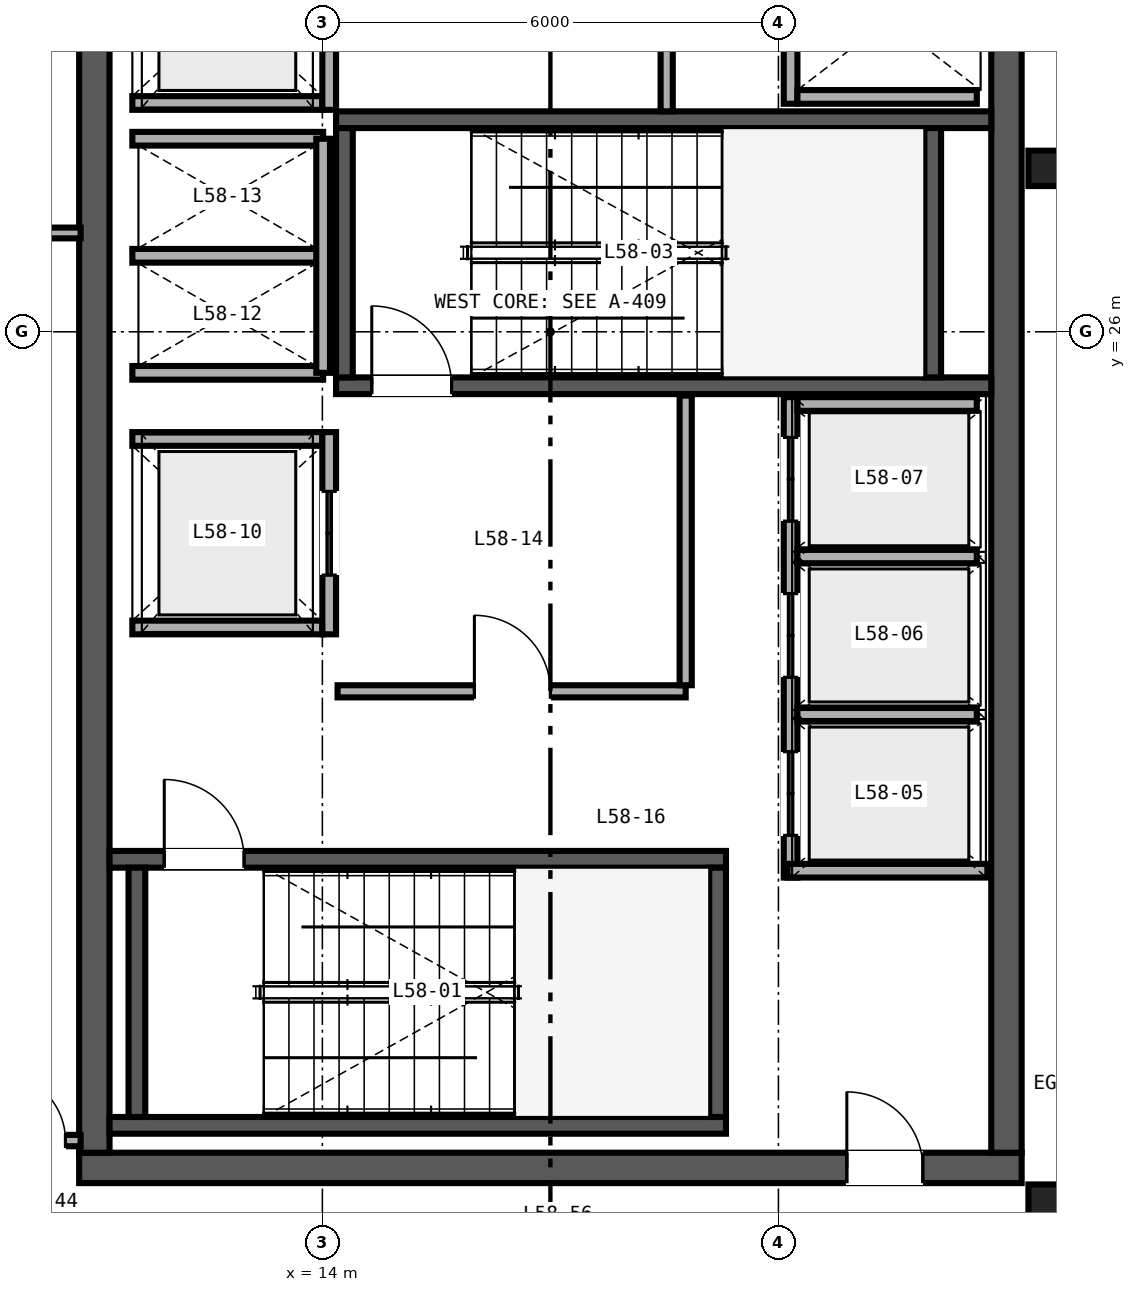
"""IFC4 building model, lengths in metres.
Left out: names, types, materials, properties, quantities, classifications, styles, units other than length and angle.
Written with IfcOpenShell. Run it as: python <this file> out.ifc"""

import sys

from ifc_helpers import new_model, si_unit, direction, frame, frame_2d, origin, origin_2d, place, context, subcontext, project, spatial, rectangle, i_section, extrude, source, transform, mapped, element, fill, save


model = new_model("IFC4")
c1 = context("Model", 3, precision=1e-05, world=origin(), true_north=direction((0.0, 1.0)))
c2 = subcontext(c1, "Body", "Model", "MODEL_VIEW")
j1 = project(units=[si_unit("LENGTHUNIT", "METRE"), si_unit("PLANEANGLEUNIT", "RADIAN")], contexts=[c1])
p1 = place(None, origin())
s1 = spatial("IfcSite", under=j1, at=p1, CompositionType="ELEMENT")
p2 = place(p1, origin())
s2 = spatial("IfcBuilding", under=s1, at=p2, CompositionType="ELEMENT")
p3 = place(p2, frame((0.0, 0.0, 232.8)))
s3 = spatial("IfcBuildingStorey", under=s2, at=p3, CompositionType="ELEMENT", Elevation=232.8)
p4 = place(p3, frame((10.8, 15.0, 0.0), z_axis=(0.0, 0.0, 1.0), x_axis=(1.0, 0.0, 0.0)))
e1 = element("IfcWall", 1, at=p4, inside=s3, PredefinedType="SHEAR", context=c2, shape_type="SweptSolid", body=[
    extrude(rectangle(XDim=12.4, YDim=0.4, at=frame_2d((6.2, 0.0))), origin(), (0.0, 0.0, 1.0), 3.38),
])
p5 = place(p4, frame((10.1, 0.0, 0.0)))
e2 = element("IfcOpeningElement", 2, at=p5, cuts=e1, PredefinedType="OPENING", context=c2, shape_type="SweptSolid", body=[
    extrude(rectangle(XDim=1.0, YDim=2.15, at=frame_2d((0.5, 1.075))), frame((0.0, 0.21, 0.0), z_axis=(0.0, -1.0, 0.0), x_axis=(1.0, 0.0, 0.0)), (0.0, 0.0, 1.0), 0.42),
])
for number, where, z_axis, x_axis in (
    (3, (11.0, 15.2, 0.0), (0.0, 0.0, 1.0), (0.0, 1.0, 0.0)),
    (4, (23.0, 15.2, 0.0), (0.0, 0.0, 1.0), (0.0, 1.0, 0.0)),
):
    element("IfcWall", number, at=place(p3, frame(where, z_axis=z_axis, x_axis=x_axis)), inside=s3, PredefinedType="SHEAR", context=c2, shape_type="SweptSolid", body=[
        extrude(rectangle(XDim=21.6, YDim=0.4, at=frame_2d((10.8, 0.0))), origin(), (0.0, 0.0, 1.0), 3.38),
    ])
p6 = place(p3, frame((11.2, 15.56, 0.0), z_axis=(0.0, 0.0, 1.0), x_axis=(1.0, 0.0, 0.0)))
e5 = element("IfcWall", 5, at=p6, inside=s3, PredefinedType="SHEAR", context=c2, shape_type="SweptSolid", body=[
    extrude(rectangle(XDim=8.11, YDim=0.22, at=frame_2d((4.055, 0.0))), origin(), (0.0, 0.0, 1.0), 3.4),
])
p7 = place(p3, frame((11.2, 19.06, 0.0), z_axis=(0.0, 0.0, 1.0), x_axis=(1.0, 0.0, 0.0)))
e6 = element("IfcWall", 6, at=p7, inside=s3, PredefinedType="SHEAR", context=c2, shape_type="SweptSolid", body=[
    extrude(rectangle(XDim=8.11, YDim=0.22, at=frame_2d((4.055, 0.0))), origin(), (0.0, 0.0, 1.0), 3.4),
])
p8 = place(p7, frame((0.72, 0.0, 0.0)))
e7 = element("IfcOpeningElement", 7, at=p8, cuts=e6, PredefinedType="OPENING", context=c2, shape_type="SweptSolid", body=[
    extrude(rectangle(XDim=1.05, YDim=2.15, at=frame_2d((0.525, 1.075))), frame((0.0, 0.12, 0.0), z_axis=(0.0, -1.0, 0.0), x_axis=(1.0, 0.0, 0.0)), (0.0, 0.0, 1.0), 0.24),
])
for number, where, z_axis, x_axis in (
    (8, (11.56, 15.67, 0.0), (0.0, 0.0, 1.0), (0.0, 1.0, 0.0)),
    (9, (19.2, 15.67, 0.0), (0.0, 0.0, 1.0), (0.0, 1.0, 0.0)),
):
    element("IfcWall", number, at=place(p3, frame(where, z_axis=z_axis, x_axis=x_axis)), inside=s3, PredefinedType="SHEAR", context=c2, shape_type="SweptSolid", body=[
        extrude(rectangle(XDim=3.28, YDim=0.22, at=frame_2d((1.64, 0.0))), origin(), (0.0, 0.0, 1.0), 3.4),
    ])
p9 = place(p3, frame((14.18, 25.29, 0.0), z_axis=(0.0, 0.0, 1.0), x_axis=(1.0, 0.0, 0.0)))
e10 = element("IfcWall", 10, at=p9, inside=s3, PredefinedType="SHEAR", context=c2, shape_type="SweptSolid", body=[
    extrude(rectangle(XDim=8.62, YDim=0.22, at=frame_2d((4.31, 0.0))), origin(), (0.0, 0.0, 1.0), 3.4),
])
p10 = place(p9, frame((0.47, 0.0, 0.0)))
e11 = element("IfcOpeningElement", 11, at=p10, cuts=e10, PredefinedType="OPENING", context=c2, shape_type="SweptSolid", body=[
    extrude(rectangle(XDim=1.05, YDim=2.15, at=frame_2d((0.525, 1.075))), frame((0.0, 0.12, 0.0), z_axis=(0.0, -1.0, 0.0), x_axis=(1.0, 0.0, 0.0)), (0.0, 0.0, 1.0), 0.24),
])
p11 = place(p3, frame((14.18, 28.79, 0.0), z_axis=(0.0, 0.0, 1.0), x_axis=(1.0, 0.0, 0.0)))
e12 = element("IfcWall", 12, at=p11, inside=s3, PredefinedType="SHEAR", context=c2, shape_type="SweptSolid", body=[
    extrude(rectangle(XDim=8.62, YDim=0.22, at=frame_2d((4.31, 0.0))), origin(), (0.0, 0.0, 1.0), 3.4),
])
for number, where, z_axis, x_axis in (
    (13, (14.29, 25.4, 0.0), (0.0, 0.0, 1.0), (0.0, 1.0, 0.0)),
    (14, (22.03, 25.4, 0.0), (0.0, 0.0, 1.0), (0.0, 1.0, 0.0)),
):
    element("IfcWall", number, at=place(p3, frame(where, z_axis=z_axis, x_axis=x_axis)), inside=s3, PredefinedType="SHEAR", context=c2, shape_type="SweptSolid", body=[
        extrude(rectangle(XDim=3.28, YDim=0.22, at=frame_2d((1.64, 0.0))), origin(), (0.0, 0.0, 1.0), 3.4),
    ])
m1 = source(origin(), c2, "Body", "SweptSolid", [
    extrude(i_section(OverallWidth=0.422, OverallDepth=0.465, WebThickness=0.045, FlangeThickness=0.073, FilletRadius=0.025, at=origin_2d()), origin(), (0.0, 0.0, 1.0), 3.38),
])
for number, where, z_axis, x_axis in (
    (15, (23.5, 14.55, 0.0), (0.0, 0.0, 1.0), (1.0, 0.0, 0.0)),
    (16, (23.5, 28.15, 0.0), (0.0, 0.0, 1.0), (1.0, 0.0, 0.0)),
):
    element("IfcColumn", number, at=place(p3, frame(where, z_axis=z_axis, x_axis=x_axis)), inside=s3, PredefinedType="COLUMN", context=c2, shape_type="MappedRepresentation", body=[
        mapped(m1, transform((0.0, 0.0, 0.0), scale=1.0)),
    ])
p12 = place(p3, frame((20.16, 18.82, 0.0), z_axis=(0.0, 0.0, 1.0), x_axis=(0.0, 1.0, 0.0)))
e17 = element("IfcWall", 17, at=p12, inside=s3, PredefinedType="SOLIDWALL", context=c2, shape_type="SweptSolid", body=[
    extrude(rectangle(XDim=6.32, YDim=0.18, at=frame_2d((3.16, 0.0))), origin(), (0.0, 0.0, 1.0), 2.48),
])
p13 = place(p12, frame((0.555, 0.0, 0.0)))
e18 = element("IfcOpeningElement", 18, at=p13, cuts=e17, PredefinedType="OPENING", context=c2, shape_type="SweptSolid", body=[
    extrude(rectangle(XDim=1.1, YDim=2.2, at=frame_2d((0.55, 1.1))), frame((0.0, 0.1, 0.0), z_axis=(0.0, -1.0, 0.0), x_axis=(1.0, 0.0, 0.0)), (0.0, 0.0, 1.0), 0.2),
])
p14 = place(p12, frame((2.635, 0.0, 0.0)))
e19 = element("IfcOpeningElement", 19, at=p14, cuts=e17, PredefinedType="OPENING", context=c2, shape_type="SweptSolid", body=[
    extrude(rectangle(XDim=1.1, YDim=2.2, at=frame_2d((0.55, 1.1))), frame((0.0, 0.1, 0.0), z_axis=(0.0, -1.0, 0.0), x_axis=(1.0, 0.0, 0.0)), (0.0, 0.0, 1.0), 0.2),
])
p15 = place(p12, frame((4.69, 0.0, 0.0)))
e20 = element("IfcOpeningElement", 20, at=p15, cuts=e17, PredefinedType="OPENING", context=c2, shape_type="SweptSolid", body=[
    extrude(rectangle(XDim=1.1, YDim=2.2, at=frame_2d((0.55, 1.1))), frame((0.0, 0.1, 0.0), z_axis=(0.0, -1.0, 0.0), x_axis=(1.0, 0.0, 0.0)), (0.0, 0.0, 1.0), 0.2),
])
p16 = place(p3, frame((20.12, 18.91, 0.0), z_axis=(0.0, 0.0, 1.0), x_axis=(1.0, 0.0, 0.0)))
e21 = element("IfcWall", 21, at=p16, inside=s3, PredefinedType="SOLIDWALL", context=c2, shape_type="SweptSolid", body=[
    extrude(rectangle(XDim=2.63, YDim=0.18, at=frame_2d((1.315, 0.0))), origin(), (0.0, 0.0, 1.0), 3.38),
])
p17 = place(p3, frame((20.25, 25.05, 0.0), z_axis=(0.0, 0.0, 1.0), x_axis=(1.0, 0.0, 0.0)))
e22 = element("IfcWall", 22, at=p17, inside=s3, PredefinedType="SOLIDWALL", context=c2, shape_type="SweptSolid", body=[
    extrude(rectangle(XDim=2.36, YDim=0.18, at=frame_2d((1.18, 0.0))), origin(), (0.0, 0.0, 1.0), 3.38),
])
p18 = place(p3, frame((20.25, 20.965, 0.0), z_axis=(0.0, 0.0, 1.0), x_axis=(1.0, 0.0, 0.0)))
e23 = element("IfcWall", 23, at=p18, inside=s3, PredefinedType="SOLIDWALL", context=c2, shape_type="SweptSolid", body=[
    extrude(rectangle(XDim=2.36, YDim=0.18, at=frame_2d((1.18, 0.0))), origin(), (0.0, 0.0, 1.0), 2.48),
])
p19 = place(p3, frame((20.25, 23.045, 0.0), z_axis=(0.0, 0.0, 1.0), x_axis=(1.0, 0.0, 0.0)))
e24 = element("IfcWall", 24, at=p19, inside=s3, PredefinedType="SOLIDWALL", context=c2, shape_type="SweptSolid", body=[
    extrude(rectangle(XDim=2.36, YDim=0.18, at=frame_2d((1.18, 0.0))), origin(), (0.0, 0.0, 1.0), 3.38),
])
p20 = place(p3, frame((20.16, 29.0, 0.0), z_axis=(0.0, 0.0, 1.0), x_axis=(0.0, 1.0, 0.0)))
e25 = element("IfcWall", 25, at=p20, inside=s3, PredefinedType="SOLIDWALL", context=c2, shape_type="SweptSolid", body=[
    extrude(rectangle(XDim=4.29, YDim=0.18, at=frame_2d((2.145, 0.0))), origin(), (0.0, 0.0, 1.0), 3.38),
])
p21 = place(p3, frame((20.25, 29.09, 0.0), z_axis=(0.0, 0.0, 1.0), x_axis=(1.0, 0.0, 0.0)))
e26 = element("IfcWall", 26, at=p21, inside=s3, PredefinedType="SOLIDWALL", context=c2, shape_type="SweptSolid", body=[
    extrude(rectangle(XDim=2.36, YDim=0.18, at=frame_2d((1.18, 0.0))), origin(), (0.0, 0.0, 1.0), 3.38),
])
for number, where, z_axis, x_axis in (
    (27, (11.5, 22.11, 0.0), (0.0, 0.0, 1.0), (1.0, 0.0, 0.0)),
    (28, (11.5, 24.59, 0.0), (0.0, 0.0, 1.0), (1.0, 0.0, 0.0)),
):
    element("IfcWall", number, at=place(p3, frame(where, z_axis=z_axis, x_axis=x_axis)), inside=s3, PredefinedType="SOLIDWALL", context=c2, shape_type="SweptSolid", body=[
        extrude(rectangle(XDim=2.5, YDim=0.18, at=frame_2d((1.25, 0.0))), origin(), (0.0, 0.0, 1.0), 3.38),
    ])
p22 = place(p3, frame((14.09, 22.02, 0.0), z_axis=(0.0, 0.0, 1.0), x_axis=(0.0, 1.0, 0.0)))
e29 = element("IfcWall", 29, at=p22, inside=s3, PredefinedType="SOLIDWALL", context=c2, shape_type="SweptSolid", body=[
    extrude(rectangle(XDim=2.66, YDim=0.18, at=frame_2d((1.33, 0.0))), origin(), (0.0, 0.0, 1.0), 3.38),
])
p23 = place(p22, frame((0.78, 0.0, 0.0)))
e30 = element("IfcOpeningElement", 30, at=p23, cuts=e29, PredefinedType="OPENING", context=c2, shape_type="SweptSolid", body=[
    extrude(rectangle(XDim=1.1, YDim=2.2, at=frame_2d((0.55, 1.1))), frame((0.0, 0.1, 0.0), z_axis=(0.0, -1.0, 0.0), x_axis=(1.0, 0.0, 0.0)), (0.0, 0.0, 1.0), 0.2),
])
p24 = place(p3, frame((11.5, 29.01, 0.0), z_axis=(0.0, 0.0, 1.0), x_axis=(1.0, 0.0, 0.0)))
e31 = element("IfcWall", 31, at=p24, inside=s3, PredefinedType="SOLIDWALL", context=c2, shape_type="SweptSolid", body=[
    extrude(rectangle(XDim=2.5, YDim=0.18, at=frame_2d((1.25, 0.0))), origin(), (0.0, 0.0, 1.0), 3.38),
])
p25 = place(p3, frame((14.09, 28.92, 0.0), z_axis=(0.0, 0.0, 1.0), x_axis=(0.0, 1.0, 0.0)))
e32 = element("IfcWall", 32, at=p25, inside=s3, PredefinedType="SOLIDWALL", context=c2, shape_type="SweptSolid", body=[
    extrude(rectangle(XDim=2.66, YDim=0.18, at=frame_2d((1.33, 0.0))), origin(), (0.0, 0.0, 1.0), 3.38),
])
p26 = place(p25, frame((0.78, 0.0, 0.0)))
e33 = element("IfcOpeningElement", 33, at=p26, cuts=e32, PredefinedType="OPENING", context=c2, shape_type="SweptSolid", body=[
    extrude(rectangle(XDim=1.1, YDim=2.2, at=frame_2d((0.55, 1.1))), frame((0.0, 0.1, 0.0), z_axis=(0.0, -1.0, 0.0), x_axis=(1.0, 0.0, 0.0)), (0.0, 0.0, 1.0), 0.2),
])
for number, where, z_axis, x_axis in (
    (34, (11.5, 25.46, 0.0), (0.0, 0.0, 1.0), (1.0, 0.0, 0.0)),
    (35, (11.5, 27.0, 0.0), (0.0, 0.0, 1.0), (1.0, 0.0, 0.0)),
    (36, (11.5, 28.54, 0.0), (0.0, 0.0, 1.0), (1.0, 0.0, 0.0)),
):
    element("IfcWall", number, at=place(p3, frame(where, z_axis=z_axis, x_axis=x_axis)), inside=s3, PredefinedType="SOLIDWALL", context=c2, shape_type="SweptSolid", body=[
        extrude(rectangle(XDim=2.51, YDim=0.18, at=frame_2d((1.255, 0.0))), origin(), (0.0, 0.0, 1.0), 3.38),
    ])
p27 = place(p3, frame((14.01, 25.46, 0.0), z_axis=(0.0, 0.0, 1.0), x_axis=(0.0, 1.0, 0.0)))
e37 = element("IfcWall", 37, at=p27, inside=s3, PredefinedType="SOLIDWALL", context=c2, shape_type="SweptSolid", body=[
    extrude(rectangle(XDim=3.08, YDim=0.18, at=frame_2d((1.54, 0.0))), origin(), (0.0, 0.0, 1.0), 3.38),
])
p28 = place(p3, frame((14.2, 21.27, 0.0), z_axis=(0.0, 0.0, 1.0), x_axis=(1.0, 0.0, 0.0)))
e38 = element("IfcWall", 38, at=p28, inside=s3, PredefinedType="PARTITIONING", context=c2, shape_type="SweptSolid", body=[
    extrude(rectangle(XDim=4.58, YDim=0.16, at=frame_2d((2.29, 0.0))), origin(), (0.0, 0.0, 1.0), 3.38),
])
p29 = place(p28, frame((1.8, 0.0, 0.0)))
e39 = element("IfcOpeningElement", 39, at=p29, cuts=e38, PredefinedType="OPENING", context=c2, shape_type="SweptSolid", body=[
    extrude(rectangle(XDim=1.0, YDim=2.15, at=frame_2d((0.5, 1.075))), frame((0.0, 0.09, 0.0), z_axis=(0.0, -1.0, 0.0), x_axis=(1.0, 0.0, 0.0)), (0.0, 0.0, 1.0), 0.18),
])
p30 = place(p3, frame((18.78, 21.35, 0.0), z_axis=(0.0, 0.0, 1.0), x_axis=(0.0, 1.0, 0.0)))
e40 = element("IfcWall", 40, at=p30, inside=s3, PredefinedType="PARTITIONING", context=c2, shape_type="SweptSolid", body=[
    extrude(rectangle(XDim=3.81, YDim=0.16, at=frame_2d((1.905, 0.0))), origin(), (0.0, 0.0, 1.0), 3.38),
])
p31 = place(p3, frame((18.53, 28.9, 0.0), z_axis=(0.0, 0.0, 1.0), x_axis=(0.0, 1.0, 0.0)))
e41 = element("IfcWall", 41, at=p31, inside=s3, PredefinedType="PARTITIONING", context=c2, shape_type="SweptSolid", body=[
    extrude(rectangle(XDim=3.9, YDim=0.16, at=frame_2d((1.95, 0.0))), origin(), (0.0, 0.0, 1.0), 3.38),
])
p32 = place(p31, frame((1.5, 0.0, 0.0)))
e42 = element("IfcOpeningElement", 42, at=p32, cuts=e41, PredefinedType="OPENING", context=c2, shape_type="SweptSolid", body=[
    extrude(rectangle(XDim=1.0, YDim=2.15, at=frame_2d((0.5, 1.075))), frame((0.0, 0.09, 0.0), z_axis=(0.0, -1.0, 0.0), x_axis=(1.0, 0.0, 0.0)), (0.0, 0.0, 1.0), 0.18),
])
p33 = place(p3, frame((8.16, 15.36, 0.0), z_axis=(0.0, 0.0, 1.0), x_axis=(1.0, 0.0, 0.0)))
e43 = element("IfcWall", 43, at=p33, inside=s3, PredefinedType="PARTITIONING", context=c2, shape_type="SweptSolid", body=[
    extrude(rectangle(XDim=2.66, YDim=0.15, at=frame_2d((1.33, 0.0))), origin(), (0.0, 0.0, 1.0), 2.601),
])
p34 = place(p33, frame((1.58, 0.0, 0.0)))
e44 = element("IfcOpeningElement", 44, at=p34, cuts=e43, PredefinedType="OPENING", context=c2, shape_type="SweptSolid", body=[
    extrude(rectangle(XDim=0.88, YDim=2.15, at=frame_2d((0.44, 1.075))), frame((0.0, 0.085, 0.0), z_axis=(0.0, -1.0, 0.0), x_axis=(1.0, 0.0, 0.0)), (0.0, 0.0, 1.0), 0.17),
])
p35 = place(p3, frame((8.16, 27.3, 0.0), z_axis=(0.0, 0.0, 1.0), x_axis=(1.0, 0.0, 0.0)))
e45 = element("IfcWall", 45, at=p35, inside=s3, PredefinedType="PARTITIONING", context=c2, shape_type="SweptSolid", body=[
    extrude(rectangle(XDim=2.66, YDim=0.142, at=frame_2d((1.33, 0.0))), origin(), (0.0, 0.0, 1.0), 2.601),
])
m2 = source(origin(), c2, "Body", "SweptSolid", [
    extrude(rectangle(XDim=1.05, YDim=2.15, at=frame_2d((0.525, 1.075))), frame((0.0, 0.025, 0.0), z_axis=(0.0, -1.0, 0.0), x_axis=(1.0, 0.0, 0.0)), (0.0, 0.0, 1.0), 0.05),
])
p36 = place(p8, origin())
e46 = element("IfcDoor", 46, at=p36, inside=s3, OperationType="SINGLE_SWING_LEFT", PredefinedType="DOOR", context=c2, shape_type="MappedRepresentation", body=[
    mapped(m2, transform((0.0, 0.0, 0.0), scale=1.0)),
])
fill(e7, e46)
p37 = place(p10, origin())
e47 = element("IfcDoor", 47, at=p37, inside=s3, OperationType="SINGLE_SWING_LEFT", PredefinedType="DOOR", context=c2, shape_type="MappedRepresentation", body=[
    mapped(m2, transform((0.0, 0.0, 0.0), scale=1.0)),
])
fill(e11, e47)
m3 = source(origin(), c2, "Body", "SweptSolid", [
    extrude(rectangle(XDim=1.1, YDim=2.2, at=frame_2d((0.55, 1.1))), frame((0.0, 0.025, 0.0), z_axis=(0.0, -1.0, 0.0), x_axis=(1.0, 0.0, 0.0)), (0.0, 0.0, 1.0), 0.05),
])
p38 = place(p13, origin())
e48 = element("IfcDoor", 48, at=p38, inside=s3, OperationType="DOUBLE_DOOR_SLIDING", PredefinedType="DOOR", context=c2, shape_type="MappedRepresentation", body=[
    mapped(m3, transform((0.0, 0.0, 0.0), scale=1.0)),
])
fill(e18, e48)
p39 = place(p14, origin())
e49 = element("IfcDoor", 49, at=p39, inside=s3, OperationType="DOUBLE_DOOR_SLIDING", PredefinedType="DOOR", context=c2, shape_type="MappedRepresentation", body=[
    mapped(m3, transform((0.0, 0.0, 0.0), scale=1.0)),
])
fill(e19, e49)
p40 = place(p15, origin())
e50 = element("IfcDoor", 50, at=p40, inside=s3, OperationType="DOUBLE_DOOR_SLIDING", PredefinedType="DOOR", context=c2, shape_type="MappedRepresentation", body=[
    mapped(m3, transform((0.0, 0.0, 0.0), scale=1.0)),
])
fill(e20, e50)
p41 = place(p23, origin())
e51 = element("IfcDoor", 51, at=p41, inside=s3, OperationType="DOUBLE_DOOR_SLIDING", PredefinedType="DOOR", context=c2, shape_type="MappedRepresentation", body=[
    mapped(m3, transform((0.0, 0.0, 0.0), scale=1.0)),
])
fill(e30, e51)
m4 = source(origin(), c2, "Body", "SweptSolid", [
    extrude(rectangle(XDim=1.0, YDim=2.15, at=frame_2d((0.5, 1.075))), frame((0.0, 0.025, 0.0), z_axis=(0.0, -1.0, 0.0), x_axis=(1.0, 0.0, 0.0)), (0.0, 0.0, 1.0), 0.05),
])
p42 = place(p29, origin())
e52 = element("IfcDoor", 52, at=p42, inside=s3, OperationType="SINGLE_SWING_LEFT", PredefinedType="DOOR", context=c2, shape_type="MappedRepresentation", body=[
    mapped(m4, transform((0.0, 0.0, 0.0), scale=1.0)),
])
fill(e39, e52)
p43 = place(p5, origin())
e53 = element("IfcDoor", 53, at=p43, inside=s3, OperationType="SINGLE_SWING_LEFT", PredefinedType="DOOR", context=c2, shape_type="MappedRepresentation", body=[
    mapped(m4, transform((0.0, 0.0, 0.0), scale=1.0)),
])
fill(e2, e53)
m5 = source(origin(), c2, "Body", "SweptSolid", [
    extrude(rectangle(XDim=0.88, YDim=2.15, at=frame_2d((0.44, 1.075))), frame((0.0, 0.025, 0.0), z_axis=(0.0, -1.0, 0.0), x_axis=(1.0, 0.0, 0.0)), (0.0, 0.0, 1.0), 0.05),
])
p44 = place(p34, origin())
e54 = element("IfcDoor", 54, at=p44, inside=s3, OperationType="SINGLE_SWING_LEFT", PredefinedType="DOOR", context=c2, shape_type="MappedRepresentation", body=[
    mapped(m5, transform((0.0, 0.0, 0.0), scale=1.0)),
])
fill(e44, e54)
save(model, sys.argv[1])
